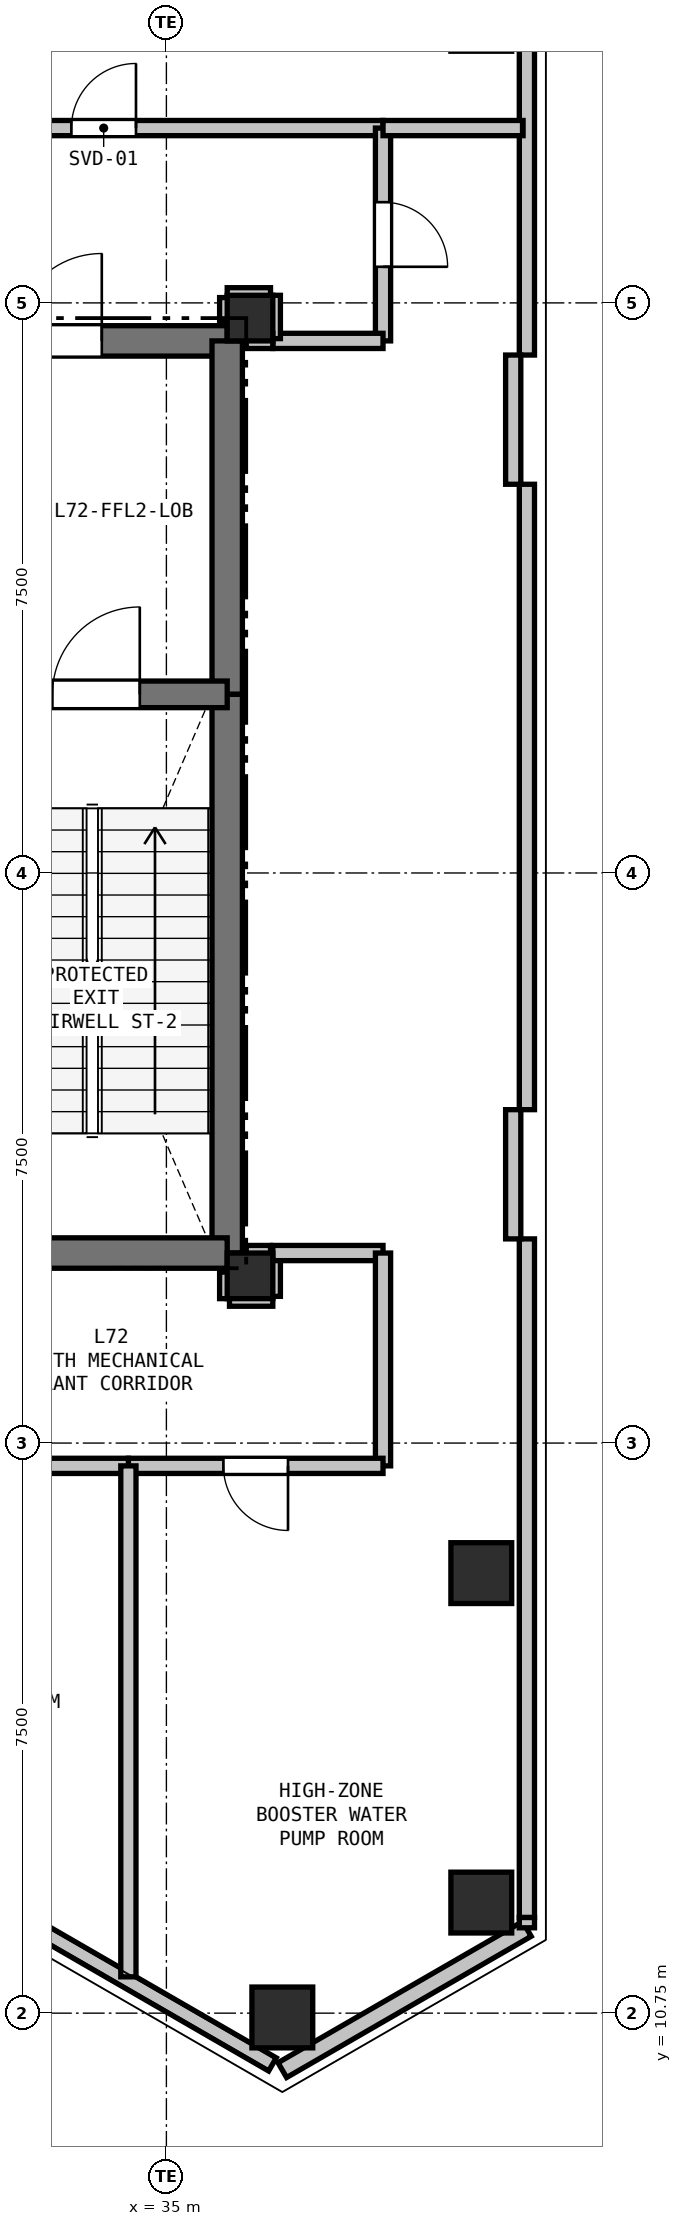
"""IFC4 building model, lengths in metres.
Left out: names, types, materials, properties, quantities, classifications, styles, units other than length and angle.
Written with IfcOpenShell. Run it as: python <this file> out.ifc"""

import sys

from ifc_helpers import new_model, si_unit, direction, frame, frame_2d, origin, origin_2d, place, context, subcontext, project, spatial, rectangle, hollow_rectangle, extrude, element, fill, save


model = new_model("IFC4")
c1 = context("Model", 3, precision=1e-05, world=origin(), true_north=direction((0.0, 1.0)))
c2 = subcontext(c1, "Body", "Model", "MODEL_VIEW")
j1 = project(units=[si_unit("LENGTHUNIT", "METRE"), si_unit("PLANEANGLEUNIT", "RADIAN")], contexts=[c1])
p1 = place(None, origin())
s1 = spatial("IfcSite", under=j1, at=p1, CompositionType="ELEMENT")
p2 = place(p1, origin())
s2 = spatial("IfcBuilding", under=s1, at=p2, CompositionType="ELEMENT")
p3 = place(p2, frame((0.0, 0.0, 258.6)))
s3 = spatial("IfcBuildingStorey", under=s2, at=p3, CompositionType="ELEMENT", Elevation=258.6)
for number, where, z_axis, x_axis in (
    (1, (36.1, 33.05, 0.0), (0.0, 0.0, 1.0), (1.0, 0.0, 0.0)),
    (2, (36.1, 20.45, 0.0), (0.0, 0.0, 1.0), (1.0, 0.0, 0.0)),
):
    element("IfcColumn", number, at=place(p3, frame(where, z_axis=z_axis, x_axis=x_axis)), inside=s3, PredefinedType="COLUMN", context=c2, shape_type="SweptSolid", body=[
        extrude(rectangle(XDim=0.6, YDim=0.6, at=origin_2d()), origin(), (0.0, 0.0, 1.0), 5.4),
    ])
for number, where, z_axis, x_axis in (
    (3, (39.143, 16.539, 0.0), (0.0, 0.0, 1.0), (1.0, 0.0, 0.0)),
    (4, (39.143, 12.205, 0.0), (0.0, 0.0, 1.0), (1.0, 0.0, 0.0)),
    (5, (36.525, 10.693, 0.0), (0.0, 0.0, 1.0), (1.0, 0.0, 0.0)),
):
    element("IfcColumn", number, at=place(p3, frame(where, z_axis=z_axis, x_axis=x_axis)), inside=s3, PredefinedType="COLUMN", context=c2, shape_type="SweptSolid", body=[
        extrude(hollow_rectangle(XDim=0.8, YDim=0.8, WallThickness=0.025, at=origin_2d()), origin(), (0.0, 0.0, 1.0), 5.4),
    ])
p4 = place(p3, frame((39.743, 11.858, 0.0), z_axis=(0.0, 0.0, 1.0), x_axis=(-0.866038962515, -0.499976514854, 0.0)))
e6 = element("IfcWall", 6, at=p4, inside=s3, PredefinedType="SOLIDWALL", context=c2, shape_type="SweptSolid", body=[
    extrude(rectangle(XDim=3.716, YDim=0.225, at=frame_2d((1.858, 0.0))), origin(), (0.0, 0.0, 1.0), 4.7),
])
p5 = place(p3, frame((39.743, 41.492, 0.0), z_axis=(0.0, 0.0, 1.0), x_axis=(0.0, -1.0, 0.0)))
e7 = element("IfcWall", 7, at=p5, inside=s3, PredefinedType="PARAPET", context=c2, shape_type="SweptSolid", body=[
    extrude(rectangle(XDim=8.928, YDim=0.2, at=frame_2d((4.464, 0.0))), origin(), (0.0, 0.0, 1.0), 0.2),
])
p6 = place(p3, frame((39.743, 30.864, 0.0), z_axis=(0.0, 0.0, 1.0), x_axis=(0.0, -1.0, 0.0)))
e8 = element("IfcWall", 8, at=p6, inside=s3, PredefinedType="PARAPET", context=c2, shape_type="SweptSolid", body=[
    extrude(rectangle(XDim=8.228, YDim=0.2, at=frame_2d((4.114, 0.0))), origin(), (0.0, 0.0, 1.0), 0.2),
])
p7 = place(p3, frame((39.743, 20.936, 0.0), z_axis=(0.0, 0.0, 1.0), x_axis=(0.0, -1.0, 0.0)))
e9 = element("IfcWall", 9, at=p7, inside=s3, PredefinedType="PARAPET", context=c2, shape_type="SweptSolid", body=[
    extrude(rectangle(XDim=8.928, YDim=0.2, at=frame_2d((4.464, 0.0))), origin(), (0.0, 0.0, 1.0), 0.2),
])
for number, where, z_axis, x_axis in (
    (10, (39.563, 32.564, 0.0), (0.0, 0.0, 1.0), (0.0, -1.0, 0.0)),
    (11, (39.563, 22.636, 0.0), (0.0, 0.0, 1.0), (0.0, -1.0, 0.0)),
):
    element("IfcWall", number, at=place(p3, frame(where, z_axis=z_axis, x_axis=x_axis)), inside=s3, PredefinedType="PARAPET", context=c2, shape_type="SweptSolid", body=[
        extrude(rectangle(XDim=1.7, YDim=0.2, at=frame_2d((0.85, 0.0))), origin(), (0.0, 0.0, 1.0), 4.7),
    ])
p8 = place(p3, frame((36.395, 10.076, 0.0), z_axis=(0.0, 0.0, 1.0), x_axis=(-0.866026655105, 0.499997832642, 0.0)))
e12 = element("IfcWall", 12, at=p8, inside=s3, PredefinedType="PARAPET", context=c2, shape_type="SweptSolid", body=[
    extrude(rectangle(XDim=8.928, YDim=0.2, at=frame_2d((4.464, 0.0))), origin(), (0.0, 0.0, 1.0), 0.2),
])
p9 = place(p3, frame((32.35, 32.75, 0.0), z_axis=(0.0, 0.0, 1.0), x_axis=(1.0, 0.0, 0.0)))
e13 = element("IfcWall", 13, at=p9, inside=s3, PredefinedType="SHEAR", context=c2, shape_type="SweptSolid", body=[
    extrude(rectangle(XDim=3.45, YDim=0.4, at=frame_2d((1.725, 0.0))), origin(), (0.0, 0.0, 1.0), 5.08),
])
p10 = place(p9, frame((0.65, 0.0, 0.0)))
e14 = element("IfcOpeningElement", 14, at=p10, cuts=e13, PredefinedType="OPENING", context=c2, shape_type="SweptSolid", body=[
    extrude(rectangle(XDim=1.15, YDim=2.15, at=frame_2d((0.575, 1.075))), frame((0.0, 0.21, 0.0), z_axis=(0.0, -1.0, 0.0), x_axis=(1.0, 0.0, 0.0)), (0.0, 0.0, 1.0), 0.42),
])
p11 = place(p3, frame((35.8, 32.75, 0.0), z_axis=(0.0, 0.0, 1.0), x_axis=(0.0, -1.0, 0.0)))
e15 = element("IfcWall", 15, at=p11, inside=s3, PredefinedType="SHEAR", context=c2, shape_type="SweptSolid", body=[
    extrude(rectangle(XDim=4.65, YDim=0.4, at=frame_2d((2.325, 0.0))), origin(), (0.0, 0.0, 1.0), 5.08),
])
p12 = place(p3, frame((35.8, 28.1, 0.0), z_axis=(0.0, 0.0, 1.0), x_axis=(0.0, -1.0, 0.0)))
e16 = element("IfcWall", 16, at=p12, inside=s3, PredefinedType="SHEAR", context=c2, shape_type="SweptSolid", body=[
    extrude(rectangle(XDim=7.35, YDim=0.4, at=frame_2d((3.675, 0.0))), origin(), (0.0, 0.0, 1.0), 5.08),
])
p13 = place(p3, frame((35.8, 20.75, 0.0), z_axis=(0.0, 0.0, 1.0), x_axis=(-1.0, 0.0, 0.0)))
e17 = element("IfcWall", 17, at=p13, inside=s3, PredefinedType="SHEAR", context=c2, shape_type="SweptSolid", body=[
    extrude(rectangle(XDim=3.45, YDim=0.4, at=frame_2d((1.725, 0.0))), origin(), (0.0, 0.0, 1.0), 5.08),
])
p14 = place(p3, frame((32.35, 28.1, 0.0), z_axis=(0.0, 0.0, 1.0), x_axis=(1.0, 0.0, 0.0)))
e18 = element("IfcWall", 18, at=p14, inside=s3, PredefinedType="SHEAR", context=c2, shape_type="SweptSolid", body=[
    extrude(rectangle(XDim=3.45, YDim=0.35, at=frame_2d((1.725, 0.0))), origin(), (0.0, 0.0, 1.0), 5.08),
])
p15 = place(p14, frame((1.15, 0.0, 0.0)))
e19 = element("IfcOpeningElement", 19, at=p15, cuts=e18, PredefinedType="OPENING", context=c2, shape_type="SweptSolid", body=[
    extrude(rectangle(XDim=1.15, YDim=2.15, at=frame_2d((0.575, 1.075))), frame((0.0, 0.185, 0.0), z_axis=(0.0, -1.0, 0.0), x_axis=(1.0, 0.0, 0.0)), (0.0, 0.0, 1.0), 0.37),
])
p16 = place(p3, frame((30.5, 35.55, 0.0), z_axis=(0.0, 0.0, 1.0), x_axis=(1.0, 0.0, 0.0)))
e20 = element("IfcWall", 20, at=p16, inside=s3, PredefinedType="PARTITIONING", context=c2, shape_type="SweptSolid", body=[
    extrude(rectangle(XDim=7.35, YDim=0.2, at=frame_2d((3.675, 0.0))), origin(), (0.0, 0.0, 1.0), 4.528),
])
p17 = place(p16, frame((3.25, 0.0, 0.0)))
e21 = element("IfcOpeningElement", 21, at=p17, cuts=e20, PredefinedType="OPENING", context=c2, shape_type="SweptSolid", body=[
    extrude(rectangle(XDim=0.85, YDim=2.1, at=frame_2d((0.425, 1.05))), frame((0.0, 0.11, 0.0), z_axis=(0.0, -1.0, 0.0), x_axis=(1.0, 0.0, 0.0)), (0.0, 0.0, 1.0), 0.22),
])
p18 = place(p3, frame((37.85, 35.55, 0.0), z_axis=(0.0, 0.0, 1.0), x_axis=(0.0, -1.0, 0.0)))
e22 = element("IfcWall", 22, at=p18, inside=s3, PredefinedType="PARTITIONING", context=c2, shape_type="SweptSolid", body=[
    extrude(rectangle(XDim=2.8, YDim=0.2, at=frame_2d((1.4, 0.0))), origin(), (0.0, 0.0, 1.0), 4.528),
])
p19 = place(p18, frame((0.975, 0.0, 0.0)))
e23 = element("IfcOpeningElement", 23, at=p19, cuts=e22, PredefinedType="OPENING", context=c2, shape_type="SweptSolid", body=[
    extrude(rectangle(XDim=0.85, YDim=2.1, at=frame_2d((0.425, 1.05))), frame((0.0, 0.11, 0.0), z_axis=(0.0, -1.0, 0.0), x_axis=(1.0, 0.0, 0.0)), (0.0, 0.0, 1.0), 0.22),
])
p20 = place(p3, frame((37.85, 32.75, 0.0), z_axis=(0.0, 0.0, 1.0), x_axis=(-1.0, 0.0, 0.0)))
e24 = element("IfcWall", 24, at=p20, inside=s3, PredefinedType="PARTITIONING", context=c2, shape_type="SweptSolid", body=[
    extrude(rectangle(XDim=1.45, YDim=0.2, at=frame_2d((0.725, 0.0))), origin(), (0.0, 0.0, 1.0), 5.08),
])
for number, where, z_axis, x_axis in (
    (25, (36.4, 32.78, 0.0), (0.0, 0.0, 1.0), (0.0, 1.0, 0.0)),
    (26, (36.37, 33.35, 0.0), (0.0, 0.0, 1.0), (-1.0, 0.0, 0.0)),
):
    element("IfcWall", number, at=place(p3, frame(where, z_axis=z_axis, x_axis=x_axis)), inside=s3, PredefinedType="PARTITIONING", context=c2, shape_type="SweptSolid", body=[
        extrude(rectangle(XDim=0.57, YDim=0.2, at=frame_2d((0.285, 0.0))), origin(), (0.0, 0.0, 1.0), 4.528),
    ])
p21 = place(p3, frame((35.8, 33.32, 0.0), z_axis=(0.0, 0.0, 1.0), x_axis=(0.0, -1.0, 0.0)))
e27 = element("IfcWall", 27, at=p21, inside=s3, PredefinedType="PARTITIONING", context=c2, shape_type="SweptSolid", body=[
    extrude(rectangle(XDim=0.32, YDim=0.2, at=frame_2d((0.16, 0.0))), origin(), (0.0, 0.0, 1.0), 4.605),
])
p22 = place(p3, frame((35.8, 20.5, 0.0), z_axis=(0.0, 0.0, 1.0), x_axis=(0.0, -1.0, 0.0)))
e28 = element("IfcWall", 28, at=p22, inside=s3, PredefinedType="PARTITIONING", context=c2, shape_type="SweptSolid", body=[
    extrude(rectangle(XDim=0.35, YDim=0.2, at=frame_2d((0.175, 0.0))), origin(), (0.0, 0.0, 1.0), 4.605),
])
p23 = place(p3, frame((35.83, 20.15, 0.0), z_axis=(0.0, 0.0, 1.0), x_axis=(1.0, 0.0, 0.0)))
e29 = element("IfcWall", 29, at=p23, inside=s3, PredefinedType="PARTITIONING", context=c2, shape_type="SweptSolid", body=[
    extrude(rectangle(XDim=0.57, YDim=0.2, at=frame_2d((0.285, 0.0))), origin(), (0.0, 0.0, 1.0), 4.528),
])
p24 = place(p3, frame((36.4, 20.18, 0.0), z_axis=(0.0, 0.0, 1.0), x_axis=(0.0, 1.0, 0.0)))
e30 = element("IfcWall", 30, at=p24, inside=s3, PredefinedType="PARTITIONING", context=c2, shape_type="SweptSolid", body=[
    extrude(rectangle(XDim=0.57, YDim=0.2, at=frame_2d((0.285, 0.0))), origin(), (0.0, 0.0, 1.0), 5.08),
])
p25 = place(p3, frame((36.4, 20.75, 0.0), z_axis=(0.0, 0.0, 1.0), x_axis=(1.0, 0.0, 0.0)))
e31 = element("IfcWall", 31, at=p25, inside=s3, PredefinedType="PARTITIONING", context=c2, shape_type="SweptSolid", body=[
    extrude(rectangle(XDim=1.45, YDim=0.2, at=frame_2d((0.725, 0.0))), origin(), (0.0, 0.0, 1.0), 5.08),
])
p26 = place(p3, frame((37.85, 20.75, 0.0), z_axis=(0.0, 0.0, 1.0), x_axis=(0.0, -1.0, 0.0)))
e32 = element("IfcWall", 32, at=p26, inside=s3, PredefinedType="PARTITIONING", context=c2, shape_type="SweptSolid", body=[
    extrude(rectangle(XDim=2.8, YDim=0.2, at=frame_2d((1.4, 0.0))), origin(), (0.0, 0.0, 1.0), 5.08),
])
p27 = place(p3, frame((37.85, 17.95, 0.0), z_axis=(0.0, 0.0, 1.0), x_axis=(-1.0, 0.0, 0.0)))
e33 = element("IfcWall", 33, at=p27, inside=s3, PredefinedType="PARTITIONING", context=c2, shape_type="SweptSolid", body=[
    extrude(rectangle(XDim=3.35, YDim=0.2, at=frame_2d((1.675, 0.0))), origin(), (0.0, 0.0, 1.0), 4.528),
])
p28 = place(p27, frame((1.25, 0.0, 0.0)))
e34 = element("IfcOpeningElement", 34, at=p28, cuts=e33, PredefinedType="OPENING", context=c2, shape_type="SweptSolid", body=[
    extrude(rectangle(XDim=0.85, YDim=2.1, at=frame_2d((0.425, 1.05))), frame((0.0, 0.11, 0.0), z_axis=(0.0, -1.0, 0.0), x_axis=(1.0, 0.0, 0.0)), (0.0, 0.0, 1.0), 0.22),
])
p29 = place(p3, frame((34.5, 17.95, 0.0), z_axis=(0.0, 0.0, 1.0), x_axis=(-1.0, 0.0, 0.0)))
e35 = element("IfcWall", 35, at=p29, inside=s3, PredefinedType="PARTITIONING", context=c2, shape_type="SweptSolid", body=[
    extrude(rectangle(XDim=4.0, YDim=0.2, at=frame_2d((2.0, 0.0))), origin(), (0.0, 0.0, 1.0), 5.08),
])
p30 = place(p29, frame((1.575, 0.0, 0.0)))
e36 = element("IfcOpeningElement", 36, at=p30, cuts=e35, PredefinedType="OPENING", context=c2, shape_type="SweptSolid", body=[
    extrude(rectangle(XDim=0.85, YDim=2.1, at=frame_2d((0.425, 1.05))), frame((0.0, 0.11, 0.0), z_axis=(0.0, -1.0, 0.0), x_axis=(1.0, 0.0, 0.0)), (0.0, 0.0, 1.0), 0.22),
])
p31 = place(p3, frame((39.693, 35.55, 0.0), z_axis=(0.0, 0.0, 1.0), x_axis=(-1.0, 0.0, 0.0)))
e37 = element("IfcWall", 37, at=p31, inside=s3, PredefinedType="PARTITIONING", context=c2, shape_type="SweptSolid", body=[
    extrude(rectangle(XDim=1.843, YDim=0.2, at=frame_2d((0.921, 0.0))), origin(), (0.0, 0.0, 1.0), 4.528),
])
p32 = place(p3, frame((34.5, 17.95, 0.0), z_axis=(0.0, 0.0, 1.0), x_axis=(0.0, -1.0, 0.0)))
e38 = element("IfcWall", 38, at=p32, inside=s3, PredefinedType="PARTITIONING", context=c2, shape_type="SweptSolid", body=[
    extrude(rectangle(XDim=6.722, YDim=0.2, at=frame_2d((3.361, 0.0))), origin(), (0.0, 0.0, 1.0), 4.805),
])
p33 = place(p3, frame((36.37, 20.75, 0.0), z_axis=(0.0, 0.0, 1.0), x_axis=(-1.0, 0.0, 0.0)))
e39 = element("IfcWall", 39, at=p33, inside=s3, PredefinedType="PARTITIONING", context=c2, shape_type="SweptSolid", body=[
    extrude(rectangle(XDim=0.32, YDim=0.2, at=frame_2d((0.16, 0.0))), origin(), (0.0, 0.0, 1.0), 4.605),
])
p34 = place(p3, frame((36.05, 32.75, 0.0), z_axis=(0.0, 0.0, 1.0), x_axis=(1.0, 0.0, 0.0)))
e40 = element("IfcWall", 40, at=p34, inside=s3, PredefinedType="PARTITIONING", context=c2, shape_type="SweptSolid", body=[
    extrude(rectangle(XDim=0.35, YDim=0.2, at=frame_2d((0.175, 0.0))), origin(), (0.0, 0.0, 1.0), 4.605),
])
p35 = place(p3, frame((39.743, 12.008, 0.0), z_axis=(0.0, 0.0, 1.0), x_axis=(0.0, -1.0, 0.0)))
e41 = element("IfcWall", 41, at=p35, inside=s3, PredefinedType="PARTITIONING", context=c2, shape_type="SweptSolid", body=[
    extrude(rectangle(XDim=0.135, YDim=0.2, at=frame_2d((0.068, 0.0))), origin(), (0.0, 0.0, 1.0), 5.08),
])
p36 = place(p15, origin())
e42 = element("IfcDoor", 42, at=p36, inside=s3, OperationType="SINGLE_SWING_RIGHT", PredefinedType="DOOR", context=c2, shape_type="SweptSolid", body=[
    extrude(rectangle(XDim=1.15, YDim=2.15, at=frame_2d((0.575, 1.075))), frame((0.0, 0.025, 0.0), z_axis=(0.0, -1.0, 0.0), x_axis=(1.0, 0.0, 0.0)), (0.0, 0.0, 1.0), 0.05),
])
fill(e19, e42)
p37 = place(p10, origin())
e43 = element("IfcDoor", 43, at=p37, inside=s3, OperationType="SINGLE_SWING_RIGHT", PredefinedType="DOOR", context=c2, shape_type="SweptSolid", body=[
    extrude(rectangle(XDim=1.15, YDim=2.15, at=frame_2d((0.575, 1.075))), frame((0.0, 0.025, 0.0), z_axis=(0.0, -1.0, 0.0), x_axis=(1.0, 0.0, 0.0)), (0.0, 0.0, 1.0), 0.05),
])
fill(e14, e43)
p38 = place(p17, origin())
e44 = element("IfcDoor", 44, at=p38, inside=s3, OperationType="SINGLE_SWING_RIGHT", PredefinedType="DOOR", context=c2, shape_type="SweptSolid", body=[
    extrude(rectangle(XDim=0.85, YDim=2.1, at=frame_2d((0.425, 1.05))), frame((0.0, 0.025, 0.0), z_axis=(0.0, -1.0, 0.0), x_axis=(1.0, 0.0, 0.0)), (0.0, 0.0, 1.0), 0.05),
])
fill(e21, e44)
p39 = place(p19, origin())
e45 = element("IfcDoor", 45, at=p39, inside=s3, OperationType="SINGLE_SWING_RIGHT", PredefinedType="DOOR", context=c2, shape_type="SweptSolid", body=[
    extrude(rectangle(XDim=0.85, YDim=2.1, at=frame_2d((0.425, 1.05))), frame((0.0, 0.025, 0.0), z_axis=(0.0, -1.0, 0.0), x_axis=(1.0, 0.0, 0.0)), (0.0, 0.0, 1.0), 0.05),
])
fill(e23, e45)
p40 = place(p28, origin())
e46 = element("IfcDoor", 46, at=p40, inside=s3, OperationType="SINGLE_SWING_LEFT", PredefinedType="DOOR", context=c2, shape_type="SweptSolid", body=[
    extrude(rectangle(XDim=0.85, YDim=2.1, at=frame_2d((0.425, 1.05))), frame((0.0, 0.025, 0.0), z_axis=(0.0, -1.0, 0.0), x_axis=(1.0, 0.0, 0.0)), (0.0, 0.0, 1.0), 0.05),
])
fill(e34, e46)
save(model, sys.argv[1])
